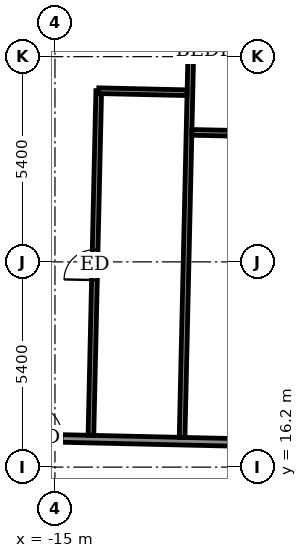
"""IFC4 building model, lengths in metres.
Left out: names, types, materials, properties, quantities, classifications, styles, units other than length and angle.
Written with IfcOpenShell. Run it as: python <this file> out.ifc"""

import sys

from ifc_helpers import new_model, si_unit, direction, frame, frame_2d, origin, place, context, subcontext, project, spatial, rectangle, extrude, element, fill, save


model = new_model("IFC4")
c1 = context("Model", 3, precision=1e-05, world=origin(), true_north=direction((0.0, 1.0)))
c2 = subcontext(c1, "Body", "Model", "MODEL_VIEW")
j1 = project(units=[si_unit("LENGTHUNIT", "METRE"), si_unit("PLANEANGLEUNIT", "RADIAN")], contexts=[c1])
p1 = place(None, origin())
s1 = spatial("IfcSite", under=j1, at=p1, CompositionType="ELEMENT")
p2 = place(p1, origin())
s2 = spatial("IfcBuilding", under=s1, at=p2, CompositionType="ELEMENT")
p3 = place(p2, frame((0.0, 0.0, 309.7)))
s3 = spatial("IfcBuildingStorey", under=s2, at=p3, CompositionType="ELEMENT", Elevation=309.7)
p4 = place(p3, frame((-30.652, 17.313, 0.0), z_axis=(0.0, 0.0, 1.0), x_axis=(0.999742623764, -0.02268669719, 0.0)))
e1 = element("IfcWall", 1, at=p4, inside=s3, PredefinedType="PARTITIONING", context=c2, shape_type="SweptSolid", body=[
    extrude(rectangle(XDim=58.8, YDim=0.2, at=frame_2d((29.4, 0.0))), origin(), (0.0, 0.0, 1.0), 3.05),
])
p5 = place(p4, frame((54.601, 0.0, 0.0)))
e2 = element("IfcOpeningElement", 2, at=p5, cuts=e1, PredefinedType="OPENING", context=c2, shape_type="SweptSolid", body=[
    extrude(rectangle(XDim=1.0, YDim=2.1, at=frame_2d((0.5, 1.05))), frame((0.0, 0.11, 0.0), z_axis=(0.0, -1.0, 0.0), x_axis=(1.0, 0.0, 0.0)), (0.0, 0.0, 1.0), 0.22),
])
p6 = place(p4, frame((49.35, 0.0, 0.0)))
e3 = element("IfcOpeningElement", 3, at=p6, cuts=e1, PredefinedType="OPENING", context=c2, shape_type="SweptSolid", body=[
    extrude(rectangle(XDim=0.9, YDim=2.1, at=frame_2d((0.45, 1.05))), frame((0.0, 0.11, 0.0), z_axis=(0.0, -1.0, 0.0), x_axis=(1.0, 0.0, 0.0)), (0.0, 0.0, 1.0), 0.22),
])
p7 = place(p4, frame((42.55, 0.0, 0.0)))
e4 = element("IfcOpeningElement", 4, at=p7, cuts=e1, PredefinedType="OPENING", context=c2, shape_type="SweptSolid", body=[
    extrude(rectangle(XDim=0.9, YDim=2.1, at=frame_2d((0.45, 1.05))), frame((0.0, 0.11, 0.0), z_axis=(0.0, -1.0, 0.0), x_axis=(1.0, 0.0, 0.0)), (0.0, 0.0, 1.0), 0.22),
])
p8 = place(p4, frame((40.475, 0.0, 0.0)))
e5 = element("IfcOpeningElement", 5, at=p8, cuts=e1, PredefinedType="OPENING", context=c2, shape_type="SweptSolid", body=[
    extrude(rectangle(XDim=0.9, YDim=2.1, at=frame_2d((0.45, 1.05))), frame((0.0, 0.11, 0.0), z_axis=(0.0, -1.0, 0.0), x_axis=(1.0, 0.0, 0.0)), (0.0, 0.0, 1.0), 0.22),
])
p9 = place(p4, frame((33.6, 0.0, 0.0)))
e6 = element("IfcOpeningElement", 6, at=p9, cuts=e1, PredefinedType="OPENING", context=c2, shape_type="SweptSolid", body=[
    extrude(rectangle(XDim=0.9, YDim=2.1, at=frame_2d((0.45, 1.05))), frame((0.0, 0.11, 0.0), z_axis=(0.0, -1.0, 0.0), x_axis=(1.0, 0.0, 0.0)), (0.0, 0.0, 1.0), 0.22),
])
p10 = place(p4, frame((31.55, 0.0, 0.0)))
e7 = element("IfcOpeningElement", 7, at=p10, cuts=e1, PredefinedType="OPENING", context=c2, shape_type="SweptSolid", body=[
    extrude(rectangle(XDim=0.9, YDim=2.1, at=frame_2d((0.45, 1.05))), frame((0.0, 0.11, 0.0), z_axis=(0.0, -1.0, 0.0), x_axis=(1.0, 0.0, 0.0)), (0.0, 0.0, 1.0), 0.22),
])
p11 = place(p4, frame((24.425, 0.0, 0.0)))
e8 = element("IfcOpeningElement", 8, at=p11, cuts=e1, PredefinedType="OPENING", context=c2, shape_type="SweptSolid", body=[
    extrude(rectangle(XDim=0.9, YDim=2.1, at=frame_2d((0.45, 1.05))), frame((0.0, 0.11, 0.0), z_axis=(0.0, -1.0, 0.0), x_axis=(1.0, 0.0, 0.0)), (0.0, 0.0, 1.0), 0.22),
])
p12 = place(p4, frame((22.05, 0.0, 0.0)))
e9 = element("IfcOpeningElement", 9, at=p12, cuts=e1, PredefinedType="OPENING", context=c2, shape_type="SweptSolid", body=[
    extrude(rectangle(XDim=0.9, YDim=2.1, at=frame_2d((0.45, 1.05))), frame((0.0, 0.11, 0.0), z_axis=(0.0, -1.0, 0.0), x_axis=(1.0, 0.0, 0.0)), (0.0, 0.0, 1.0), 0.22),
])
p13 = place(p4, frame((14.95, 0.0, 0.0)))
e10 = element("IfcOpeningElement", 10, at=p13, cuts=e1, PredefinedType="OPENING", context=c2, shape_type="SweptSolid", body=[
    extrude(rectangle(XDim=0.9, YDim=2.1, at=frame_2d((0.45, 1.05))), frame((0.0, 0.11, 0.0), z_axis=(0.0, -1.0, 0.0), x_axis=(1.0, 0.0, 0.0)), (0.0, 0.0, 1.0), 0.22),
])
p14 = place(p4, frame((12.525, 0.0, 0.0)))
e11 = element("IfcOpeningElement", 11, at=p14, cuts=e1, PredefinedType="OPENING", context=c2, shape_type="SweptSolid", body=[
    extrude(rectangle(XDim=0.9, YDim=2.1, at=frame_2d((0.45, 1.05))), frame((0.0, 0.11, 0.0), z_axis=(0.0, -1.0, 0.0), x_axis=(1.0, 0.0, 0.0)), (0.0, 0.0, 1.0), 0.22),
])
p15 = place(p4, frame((4.032, 0.0, 0.0)))
e12 = element("IfcOpeningElement", 12, at=p15, cuts=e1, PredefinedType="OPENING", context=c2, shape_type="SweptSolid", body=[
    extrude(rectangle(XDim=1.0, YDim=2.1, at=frame_2d((0.5, 1.05))), frame((0.0, 0.11, 0.0), z_axis=(0.0, -1.0, 0.0), x_axis=(1.0, 0.0, 0.0)), (0.0, 0.0, 1.0), 0.22),
])
p16 = place(p3, frame((-14.054, 17.037, 0.0), z_axis=(0.0, 0.0, 1.0), x_axis=(0.022720182365, 0.999741863339, 0.0)))
e13 = element("IfcWall", 13, at=p16, inside=s3, PredefinedType="PARTITIONING", context=c2, shape_type="SweptSolid", body=[
    extrude(rectangle(XDim=9.069, YDim=0.15, at=frame_2d((4.535, 0.0))), origin(), (0.0, 0.0, 1.0), 3.05),
])
p17 = place(p16, frame((4.085, 0.0, 0.0)))
e14 = element("IfcOpeningElement", 14, at=p17, cuts=e13, PredefinedType="OPENING", context=c2, shape_type="SweptSolid", body=[
    extrude(rectangle(XDim=0.8, YDim=2.1, at=frame_2d((0.4, 1.05))), frame((0.0, 0.085, 0.0), z_axis=(0.0, -1.0, 0.0), x_axis=(1.0, 0.0, 0.0)), (0.0, 0.0, 1.0), 0.17),
])
p18 = place(p3, frame((-11.655, 16.982, 0.0), z_axis=(0.0, 0.0, 1.0), x_axis=(0.022740189192, 0.999741408463, 0.0)))
e15 = element("IfcWall", 15, at=p18, inside=s3, PredefinedType="PARTITIONING", context=c2, shape_type="SweptSolid", body=[
    extrude(rectangle(XDim=12.4, YDim=0.15, at=frame_2d((6.2, 0.0))), origin(), (0.0, 0.0, 1.0), 2.5),
])
p19 = place(p3, frame((-11.398, 25.008, 0.0), z_axis=(0.0, 0.0, 1.0), x_axis=(0.999749954681, -0.022361308448, 0.0)))
e16 = element("IfcWall", 16, at=p19, inside=s3, PredefinedType="PARTITIONING", context=c2, shape_type="SweptSolid", body=[
    extrude(rectangle(XDim=2.325, YDim=0.15, at=frame_2d((1.163, 0.0))), origin(), (0.0, 0.0, 1.0), 3.05),
])
p20 = place(p3, frame((-13.848, 26.104, 0.0), z_axis=(0.0, 0.0, 1.0), x_axis=(0.999740260747, -0.02279059109, 0.0)))
e17 = element("IfcWall", 17, at=p20, inside=s3, PredefinedType="PARTITIONING", context=c2, shape_type="SweptSolid", body=[
    extrude(rectangle(XDim=2.324, YDim=0.15, at=frame_2d((1.162, 0.0))), origin(), (0.0, 0.0, 1.0), 3.05),
])
p21 = place(p13, origin())
e18 = element("IfcDoor", 18, at=p21, inside=s3, OperationType="SINGLE_SWING_RIGHT", PredefinedType="DOOR", context=c2, shape_type="SweptSolid", body=[
    extrude(rectangle(XDim=0.9, YDim=2.1, at=frame_2d((0.45, 1.05))), frame((0.0, 0.025, 0.0), z_axis=(0.0, -1.0, 0.0), x_axis=(1.0, 0.0, 0.0)), (0.0, 0.0, 1.0), 0.05),
])
fill(e10, e18)
p22 = place(p17, origin())
e19 = element("IfcDoor", 19, at=p22, inside=s3, OperationType="SINGLE_SWING_RIGHT", PredefinedType="DOOR", context=c2, shape_type="SweptSolid", body=[
    extrude(rectangle(XDim=0.8, YDim=2.1, at=frame_2d((0.4, 1.05))), frame((0.0, 0.025, 0.0), z_axis=(0.0, -1.0, 0.0), x_axis=(1.0, 0.0, 0.0)), (0.0, 0.0, 1.0), 0.05),
])
fill(e14, e19)
save(model, sys.argv[1])
